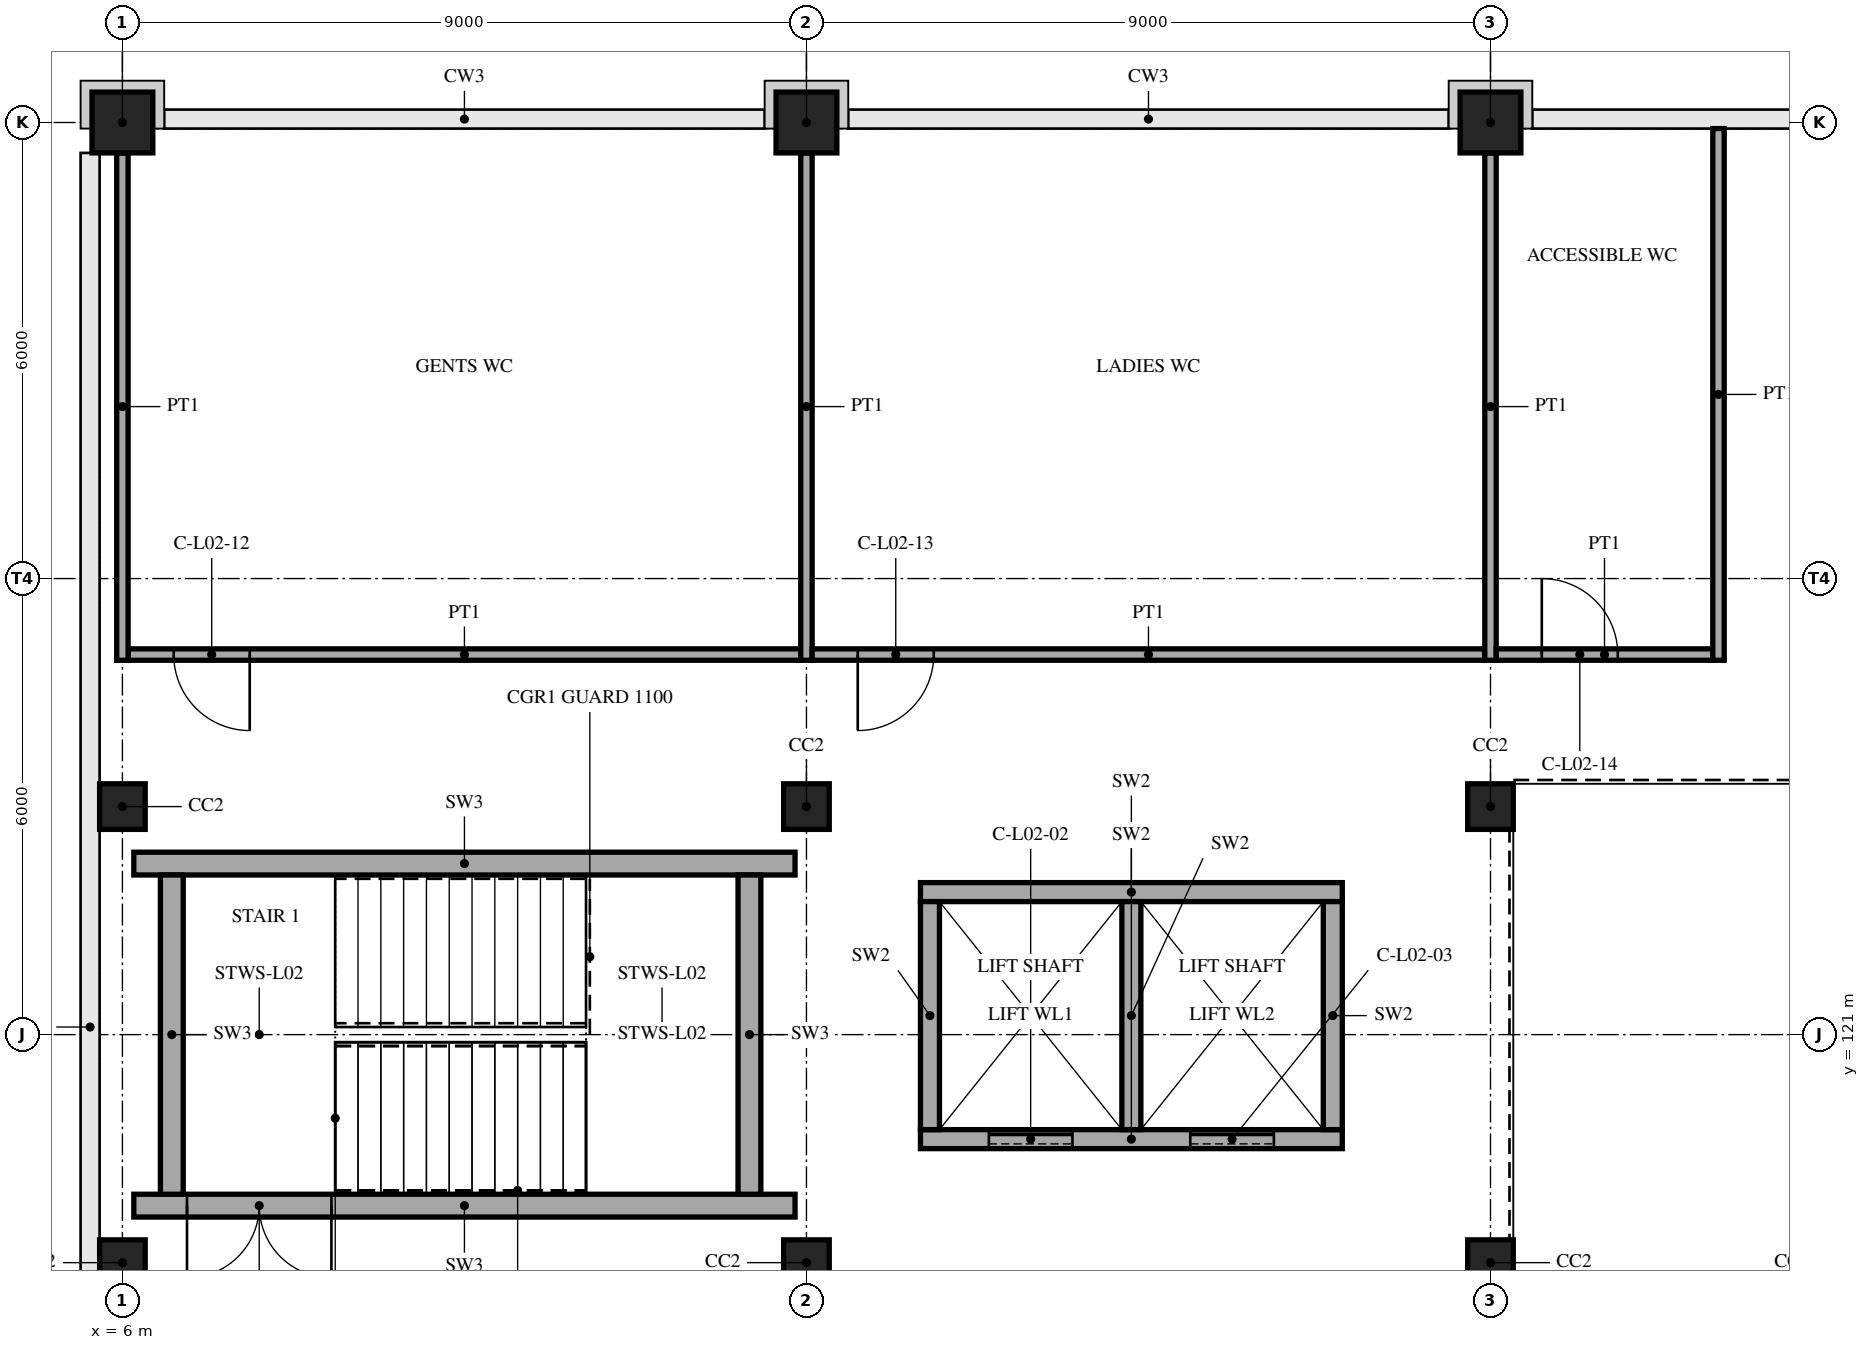
"""IFC4 building model, lengths in metres.
Left out: names, types, materials, properties, quantities, classifications, styles, units other than length and angle.
Written with IfcOpenShell. Run it as: python <this file> out.ifc"""

import sys

from ifc_helpers import new_model, si_unit, direction, frame, frame_2d, origin, origin_2d, place, context, subcontext, project, spatial, rectangle, extrude, element, fill, save


model = new_model("IFC4")
c1 = context("Model", 3, precision=1e-05, world=origin(), true_north=direction((0.0, 1.0)))
c2 = subcontext(c1, "Body", "Model", "MODEL_VIEW")
j1 = project(units=[si_unit("LENGTHUNIT", "METRE"), si_unit("PLANEANGLEUNIT", "RADIAN")], contexts=[c1])
p1 = place(None, origin())
s1 = spatial("IfcSite", under=j1, at=p1, CompositionType="ELEMENT")
p2 = place(p1, origin())
s2 = spatial("IfcBuilding", under=s1, at=p2, CompositionType="ELEMENT")
p3 = place(p2, frame((0.0, 0.0, 10.0)))
s3 = spatial("IfcBuildingStorey", under=s2, at=p3, CompositionType="ELEMENT", Elevation=10.0)
for number, where, z_axis, x_axis in (
    (1, (6.0, 118.0, 0.0), (0.0, 0.0, 1.0), (1.0, 0.0, 0.0)),
    (2, (6.0, 124.0, 0.0), (0.0, 0.0, 1.0), (1.0, 0.0, 0.0)),
):
    element("IfcColumn", number, at=place(p3, frame(where, z_axis=z_axis, x_axis=x_axis)), inside=s3, PredefinedType="COLUMN", context=c2, shape_type="SweptSolid", body=[
        extrude(rectangle(XDim=0.6, YDim=0.6, at=origin_2d()), origin(), (0.0, 0.0, 1.0), 5.0),
    ])
p4 = place(p3, frame((6.0, 133.0, 0.0), z_axis=(0.0, 0.0, 1.0), x_axis=(1.0, 0.0, 0.0)))
e3 = element("IfcColumn", 3, at=p4, inside=s3, PredefinedType="COLUMN", context=c2, shape_type="SweptSolid", body=[
    extrude(rectangle(XDim=0.8, YDim=0.8, at=origin_2d()), origin(), (0.0, 0.0, 1.0), 5.0),
])
for number, where, z_axis, x_axis in (
    (4, (15.0, 118.0, 0.0), (0.0, 0.0, 1.0), (1.0, 0.0, 0.0)),
    (5, (15.0, 124.0, 0.0), (0.0, 0.0, 1.0), (1.0, 0.0, 0.0)),
):
    element("IfcColumn", number, at=place(p3, frame(where, z_axis=z_axis, x_axis=x_axis)), inside=s3, PredefinedType="COLUMN", context=c2, shape_type="SweptSolid", body=[
        extrude(rectangle(XDim=0.6, YDim=0.6, at=origin_2d()), origin(), (0.0, 0.0, 1.0), 5.0),
    ])
p5 = place(p3, frame((15.0, 133.0, 0.0), z_axis=(0.0, 0.0, 1.0), x_axis=(1.0, 0.0, 0.0)))
e6 = element("IfcColumn", 6, at=p5, inside=s3, PredefinedType="COLUMN", context=c2, shape_type="SweptSolid", body=[
    extrude(rectangle(XDim=0.8, YDim=0.8, at=origin_2d()), origin(), (0.0, 0.0, 1.0), 5.0),
])
for number, where, z_axis, x_axis in (
    (7, (24.0, 118.0, 0.0), (0.0, 0.0, 1.0), (1.0, 0.0, 0.0)),
    (8, (24.0, 124.0, 0.0), (0.0, 0.0, 1.0), (1.0, 0.0, 0.0)),
):
    element("IfcColumn", number, at=place(p3, frame(where, z_axis=z_axis, x_axis=x_axis)), inside=s3, PredefinedType="COLUMN", context=c2, shape_type="SweptSolid", body=[
        extrude(rectangle(XDim=0.6, YDim=0.6, at=origin_2d()), origin(), (0.0, 0.0, 1.0), 5.0),
    ])
p6 = place(p3, frame((24.0, 133.0, 0.0), z_axis=(0.0, 0.0, 1.0), x_axis=(1.0, 0.0, 0.0)))
e9 = element("IfcColumn", 9, at=p6, inside=s3, PredefinedType="COLUMN", context=c2, shape_type="SweptSolid", body=[
    extrude(rectangle(XDim=0.8, YDim=0.8, at=origin_2d()), origin(), (0.0, 0.0, 1.0), 5.0),
])
p7 = place(p3, frame((6.15, 118.75, 0.0), z_axis=(0.0, 0.0, 1.0), x_axis=(1.0, 0.0, 0.0)))
e10 = element("IfcWall", 10, at=p7, inside=s3, PredefinedType="SHEAR", context=c2, shape_type="SweptSolid", body=[
    extrude(rectangle(XDim=8.7, YDim=0.3, at=frame_2d((4.35, 0.0))), origin(), (0.0, 0.0, 1.0), 5.0),
])
p8 = place(p7, frame((0.7, 0.0, 0.0)))
e11 = element("IfcOpeningElement", 11, at=p8, cuts=e10, PredefinedType="OPENING", context=c2, shape_type="SweptSolid", body=[
    extrude(rectangle(XDim=1.9, YDim=2.1, at=frame_2d((0.95, 1.05))), frame((0.0, 0.16, 0.0), z_axis=(0.0, -1.0, 0.0), x_axis=(1.0, 0.0, 0.0)), (0.0, 0.0, 1.0), 0.32),
])
p9 = place(p3, frame((6.15, 123.25, 0.0), z_axis=(0.0, 0.0, 1.0), x_axis=(1.0, 0.0, 0.0)))
e12 = element("IfcWall", 12, at=p9, inside=s3, PredefinedType="SHEAR", context=c2, shape_type="SweptSolid", body=[
    extrude(rectangle(XDim=8.7, YDim=0.3, at=frame_2d((4.35, 0.0))), origin(), (0.0, 0.0, 1.0), 5.0),
])
for number, where, z_axis, x_axis in (
    (13, (6.65, 118.9, 0.0), (0.0, 0.0, 1.0), (0.0, 1.0, 0.0)),
    (14, (14.25, 118.9, 0.0), (0.0, 0.0, 1.0), (0.0, 1.0, 0.0)),
):
    element("IfcWall", number, at=place(p3, frame(where, z_axis=z_axis, x_axis=x_axis)), inside=s3, PredefinedType="SHEAR", context=c2, shape_type="SweptSolid", body=[
        extrude(rectangle(XDim=4.2, YDim=0.3, at=frame_2d((2.1, 0.0))), origin(), (0.0, 0.0, 1.0), 5.0),
    ])
p10 = place(p3, frame((16.5, 119.625, 0.0), z_axis=(0.0, 0.0, 1.0), x_axis=(1.0, 0.0, 0.0)))
e15 = element("IfcWall", 15, at=p10, inside=s3, PredefinedType="SHEAR", context=c2, shape_type="SweptSolid", body=[
    extrude(rectangle(XDim=5.55, YDim=0.25, at=frame_2d((2.775, 0.0))), origin(), (0.0, 0.0, 1.0), 5.0),
])
p11 = place(p10, frame((0.9, 0.0, 0.0)))
e16 = element("IfcOpeningElement", 16, at=p11, cuts=e15, PredefinedType="OPENING", context=c2, shape_type="SweptSolid", body=[
    extrude(rectangle(XDim=1.1, YDim=2.1, at=frame_2d((0.55, 1.05))), frame((0.0, 0.135, 0.0), z_axis=(0.0, -1.0, 0.0), x_axis=(1.0, 0.0, 0.0)), (0.0, 0.0, 1.0), 0.27),
])
p12 = place(p10, frame((3.55, 0.0, 0.0)))
e17 = element("IfcOpeningElement", 17, at=p12, cuts=e15, PredefinedType="OPENING", context=c2, shape_type="SweptSolid", body=[
    extrude(rectangle(XDim=1.1, YDim=2.1, at=frame_2d((0.55, 1.05))), frame((0.0, 0.135, 0.0), z_axis=(0.0, -1.0, 0.0), x_axis=(1.0, 0.0, 0.0)), (0.0, 0.0, 1.0), 0.27),
])
p13 = place(p3, frame((16.5, 122.875, 0.0), z_axis=(0.0, 0.0, 1.0), x_axis=(1.0, 0.0, 0.0)))
e18 = element("IfcWall", 18, at=p13, inside=s3, PredefinedType="SHEAR", context=c2, shape_type="SweptSolid", body=[
    extrude(rectangle(XDim=5.55, YDim=0.25, at=frame_2d((2.775, 0.0))), origin(), (0.0, 0.0, 1.0), 5.0),
])
for number, where, z_axis, x_axis in (
    (19, (16.625, 119.75, 0.0), (0.0, 0.0, 1.0), (0.0, 1.0, 0.0)),
    (20, (21.925, 119.75, 0.0), (0.0, 0.0, 1.0), (0.0, 1.0, 0.0)),
    (21, (19.275, 119.75, 0.0), (0.0, 0.0, 1.0), (0.0, 1.0, 0.0)),
):
    element("IfcWall", number, at=place(p3, frame(where, z_axis=z_axis, x_axis=x_axis)), inside=s3, PredefinedType="SHEAR", context=c2, shape_type="SweptSolid", body=[
        extrude(rectangle(XDim=3.0, YDim=0.25, at=frame_2d((1.5, 0.0))), origin(), (0.0, 0.0, 1.0), 5.0),
    ])
p14 = place(p3, frame((6.075, 126.0, 0.0), z_axis=(0.0, 0.0, 1.0), x_axis=(1.0, 0.0, 0.0)))
e22 = element("IfcWall", 22, at=p14, inside=s3, PredefinedType="PARTITIONING", context=c2, shape_type="SweptSolid", body=[
    extrude(rectangle(XDim=8.85, YDim=0.15, at=frame_2d((4.425, 0.0))), origin(), (0.0, 0.0, 1.0), 4.8),
])
p15 = place(p14, frame((0.6, 0.0, 0.0)))
e23 = element("IfcOpeningElement", 23, at=p15, cuts=e22, PredefinedType="OPENING", context=c2, shape_type="SweptSolid", body=[
    extrude(rectangle(XDim=1.0, YDim=2.1, at=frame_2d((0.5, 1.05))), frame((0.0, 0.085, 0.0), z_axis=(0.0, -1.0, 0.0), x_axis=(1.0, 0.0, 0.0)), (0.0, 0.0, 1.0), 0.17),
])
for number, where, z_axis, x_axis in (
    (24, (6.0, 125.925, 0.0), (0.0, 0.0, 1.0), (0.0, 1.0, 0.0)),
    (25, (15.0, 125.925, 0.0), (0.0, 0.0, 1.0), (0.0, 1.0, 0.0)),
):
    element("IfcWall", number, at=place(p3, frame(where, z_axis=z_axis, x_axis=x_axis)), inside=s3, PredefinedType="PARTITIONING", context=c2, shape_type="SweptSolid", body=[
        extrude(rectangle(XDim=6.675, YDim=0.15, at=frame_2d((3.337, 0.0))), origin(), (0.0, 0.0, 1.0), 4.0),
    ])
p16 = place(p3, frame((15.075, 126.0, 0.0), z_axis=(0.0, 0.0, 1.0), x_axis=(1.0, 0.0, 0.0)))
e26 = element("IfcWall", 26, at=p16, inside=s3, PredefinedType="PARTITIONING", context=c2, shape_type="SweptSolid", body=[
    extrude(rectangle(XDim=8.85, YDim=0.15, at=frame_2d((4.425, 0.0))), origin(), (0.0, 0.0, 1.0), 4.8),
])
p17 = place(p16, frame((0.6, 0.0, 0.0)))
e27 = element("IfcOpeningElement", 27, at=p17, cuts=e26, PredefinedType="OPENING", context=c2, shape_type="SweptSolid", body=[
    extrude(rectangle(XDim=1.0, YDim=2.1, at=frame_2d((0.5, 1.05))), frame((0.0, 0.085, 0.0), z_axis=(0.0, -1.0, 0.0), x_axis=(1.0, 0.0, 0.0)), (0.0, 0.0, 1.0), 0.17),
])
p18 = place(p3, frame((24.0, 125.925, 0.0), z_axis=(0.0, 0.0, 1.0), x_axis=(0.0, 1.0, 0.0)))
e28 = element("IfcWall", 28, at=p18, inside=s3, PredefinedType="PARTITIONING", context=c2, shape_type="SweptSolid", body=[
    extrude(rectangle(XDim=6.675, YDim=0.15, at=frame_2d((3.337, 0.0))), origin(), (0.0, 0.0, 1.0), 4.0),
])
p19 = place(p3, frame((24.075, 126.0, 0.0), z_axis=(0.0, 0.0, 1.0), x_axis=(1.0, 0.0, 0.0)))
e29 = element("IfcWall", 29, at=p19, inside=s3, PredefinedType="PARTITIONING", context=c2, shape_type="SweptSolid", body=[
    extrude(rectangle(XDim=2.85, YDim=0.15, at=frame_2d((1.425, 0.0))), origin(), (0.0, 0.0, 1.0), 4.8),
])
p20 = place(p19, frame((0.6, 0.0, 0.0)))
e30 = element("IfcOpeningElement", 30, at=p20, cuts=e29, PredefinedType="OPENING", context=c2, shape_type="SweptSolid", body=[
    extrude(rectangle(XDim=1.0, YDim=2.1, at=frame_2d((0.5, 1.05))), frame((0.0, 0.085, 0.0), z_axis=(0.0, -1.0, 0.0), x_axis=(1.0, 0.0, 0.0)), (0.0, 0.0, 1.0), 0.17),
])
p21 = place(p3, frame((27.0, 125.925, 0.0), z_axis=(0.0, 0.0, 1.0), x_axis=(0.0, 1.0, 0.0)))
e31 = element("IfcWall", 31, at=p21, inside=s3, PredefinedType="PARTITIONING", context=c2, shape_type="SweptSolid", body=[
    extrude(rectangle(XDim=6.995, YDim=0.15, at=frame_2d((3.498, 0.0))), origin(), (0.0, 0.0, 1.0), 4.8),
])
p22 = place(p8, frame((1.9, 0.0, 0.0), z_axis=(0.0, 0.0, 1.0), x_axis=(-1.0, 0.0, 0.0)))
e32 = element("IfcDoor", 32, at=p22, inside=s3, OperationType="DOUBLE_DOOR_SINGLE_SWING", PredefinedType="NOTDEFINED", context=c2, shape_type="SweptSolid", body=[
    extrude(rectangle(XDim=1.9, YDim=2.1, at=frame_2d((0.95, 1.05))), frame((0.0, 0.025, 0.0), z_axis=(0.0, -1.0, 0.0), x_axis=(1.0, 0.0, 0.0)), (0.0, 0.0, 1.0), 0.05),
])
fill(e11, e32)
p23 = place(p11, origin())
e33 = element("IfcDoor", 33, at=p23, inside=s3, OperationType="DOUBLE_DOOR_SLIDING", PredefinedType="NOTDEFINED", context=c2, shape_type="SweptSolid", body=[
    extrude(rectangle(XDim=1.1, YDim=2.1, at=frame_2d((0.55, 1.05))), frame((0.0, 0.025, 0.0), z_axis=(0.0, -1.0, 0.0), x_axis=(1.0, 0.0, 0.0)), (0.0, 0.0, 1.0), 0.05),
])
fill(e16, e33)
p24 = place(p12, origin())
e34 = element("IfcDoor", 34, at=p24, inside=s3, OperationType="DOUBLE_DOOR_SLIDING", PredefinedType="NOTDEFINED", context=c2, shape_type="SweptSolid", body=[
    extrude(rectangle(XDim=1.1, YDim=2.1, at=frame_2d((0.55, 1.05))), frame((0.0, 0.025, 0.0), z_axis=(0.0, -1.0, 0.0), x_axis=(1.0, 0.0, 0.0)), (0.0, 0.0, 1.0), 0.05),
])
fill(e17, e34)
p25 = place(p15, frame((1.0, 0.0, 0.0), z_axis=(0.0, 0.0, 1.0), x_axis=(-1.0, 0.0, 0.0)))
e35 = element("IfcDoor", 35, at=p25, inside=s3, OperationType="SINGLE_SWING_LEFT", PredefinedType="NOTDEFINED", context=c2, shape_type="SweptSolid", body=[
    extrude(rectangle(XDim=1.0, YDim=2.1, at=frame_2d((0.5, 1.05))), frame((0.0, 0.025, 0.0), z_axis=(0.0, -1.0, 0.0), x_axis=(1.0, 0.0, 0.0)), (0.0, 0.0, 1.0), 0.05),
])
fill(e23, e35)
p26 = place(p17, frame((1.0, 0.0, 0.0), z_axis=(0.0, 0.0, 1.0), x_axis=(-1.0, 0.0, 0.0)))
e36 = element("IfcDoor", 36, at=p26, inside=s3, OperationType="SINGLE_SWING_RIGHT", PredefinedType="NOTDEFINED", context=c2, shape_type="SweptSolid", body=[
    extrude(rectangle(XDim=1.0, YDim=2.1, at=frame_2d((0.5, 1.05))), frame((0.0, 0.025, 0.0), z_axis=(0.0, -1.0, 0.0), x_axis=(1.0, 0.0, 0.0)), (0.0, 0.0, 1.0), 0.05),
])
fill(e27, e36)
p27 = place(p20, origin())
e37 = element("IfcDoor", 37, at=p27, inside=s3, OperationType="SINGLE_SWING_LEFT", PredefinedType="NOTDEFINED", context=c2, shape_type="SweptSolid", body=[
    extrude(rectangle(XDim=1.0, YDim=2.1, at=frame_2d((0.5, 1.05))), frame((0.0, 0.025, 0.0), z_axis=(0.0, -1.0, 0.0), x_axis=(1.0, 0.0, 0.0)), (0.0, 0.0, 1.0), 0.05),
])
fill(e30, e37)
save(model, sys.argv[1])
